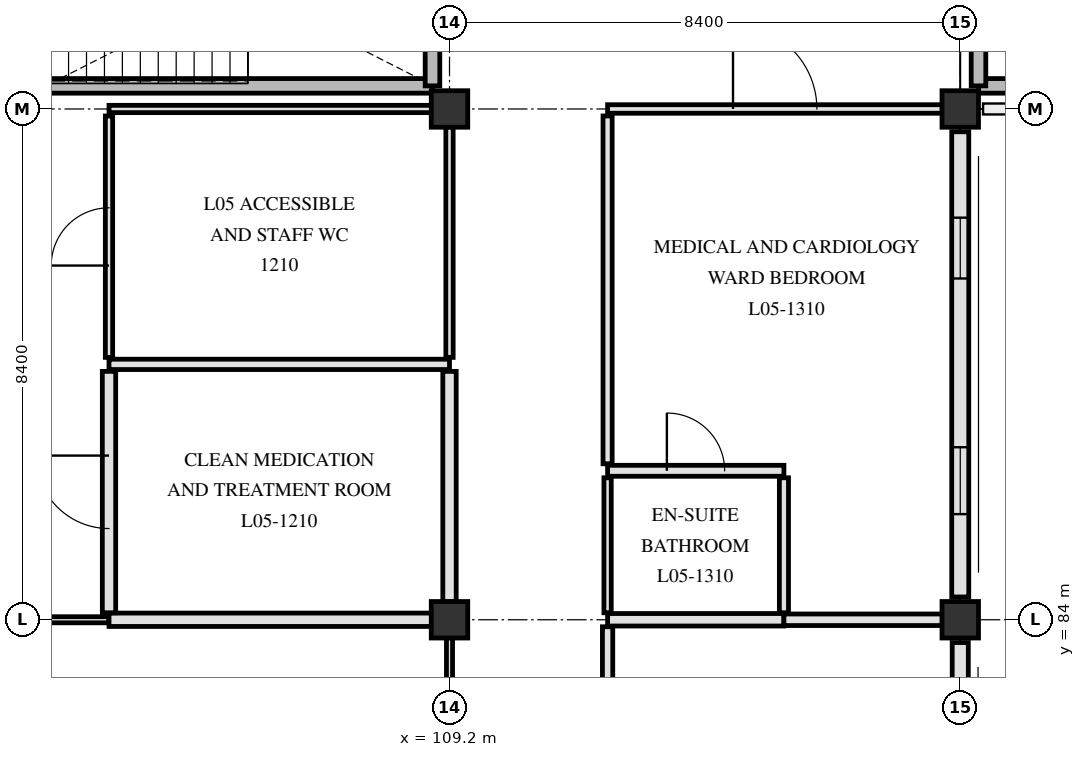
"""IFC4 building model, lengths in metres.
Left out: names, types, materials, properties, quantities, classifications, styles, units other than length and angle.
Written with IfcOpenShell. Run it as: python <this file> out.ifc"""

import sys

from ifc_helpers import new_model, si_unit, direction, frame, frame_2d, origin, origin_2d, place, context, subcontext, project, spatial, rectangle, extrude, element, fill, save


model = new_model("IFC4")
c1 = context("Model", 3, precision=1e-05, world=origin(), true_north=direction((0.0, 1.0)))
c2 = subcontext(c1, "Body", "Model", "MODEL_VIEW")
j1 = project(units=[si_unit("LENGTHUNIT", "METRE"), si_unit("PLANEANGLEUNIT", "RADIAN")], contexts=[c1])
p1 = place(None, origin())
s1 = spatial("IfcSite", under=j1, at=p1, CompositionType="ELEMENT")
p2 = place(p1, origin())
s2 = spatial("IfcBuilding", under=s1, at=p2, CompositionType="ELEMENT")
p3 = place(p2, frame((0.0, 0.0, 22.5)))
s3 = spatial("IfcBuildingStorey", under=s2, at=p3, CompositionType="ELEMENT", Elevation=22.5)
for number, where, z_axis, x_axis in (
    (1, (109.2, 84.0, 0.0), (0.0, 0.0, 1.0), (1.0, 0.0, 0.0)),
    (2, (109.2, 92.4, 0.0), (0.0, 0.0, 1.0), (1.0, 0.0, 0.0)),
    (3, (117.6, 84.0, 0.0), (0.0, 0.0, 1.0), (1.0, 0.0, 0.0)),
    (4, (117.6, 92.4, 0.0), (0.0, 0.0, 1.0), (1.0, 0.0, 0.0)),
):
    element("IfcColumn", number, at=place(p3, frame(where, z_axis=z_axis, x_axis=x_axis)), inside=s3, PredefinedType="COLUMN", context=c2, shape_type="SweptSolid", body=[
        extrude(rectangle(XDim=0.6, YDim=0.6, at=origin_2d()), origin(), (0.0, 0.0, 1.0), 3.9),
    ])
p4 = place(p3, frame((117.6, 92.025, 0.0), z_axis=(0.0, 0.0, 1.0), x_axis=(0.0, -1.0, 0.0)))
e5 = element("IfcWall", 5, at=p4, inside=s3, PredefinedType="SOLIDWALL", context=c2, shape_type="SweptSolid", body=[
    extrude(rectangle(XDim=7.65, YDim=0.28, at=frame_2d((3.825, 0.0))), origin(), (0.0, 0.0, 1.0), 3.34),
])
p5 = place(p4, frame((1.413, 0.0, 0.85)))
e6 = element("IfcOpeningElement", 6, at=p5, cuts=e5, PredefinedType="OPENING", context=c2, shape_type="SweptSolid", body=[
    extrude(rectangle(XDim=1.0, YDim=1.42, at=frame_2d((0.5, 0.71))), frame((0.0, 0.15, 0.0), z_axis=(0.0, -1.0, 0.0), x_axis=(1.0, 0.0, 0.0)), (0.0, 0.0, 1.0), 0.3),
])
p6 = place(p4, frame((5.188, 0.0, 0.85)))
e7 = element("IfcOpeningElement", 7, at=p6, cuts=e5, PredefinedType="OPENING", context=c2, shape_type="SweptSolid", body=[
    extrude(rectangle(XDim=1.1, YDim=1.42, at=frame_2d((0.55, 0.71))), frame((0.0, 0.15, 0.0), z_axis=(0.0, -1.0, 0.0), x_axis=(1.0, 0.0, 0.0)), (0.0, 0.0, 1.0), 0.3),
])
p7 = place(p3, frame((117.6, 83.625, 0.0), z_axis=(0.0, 0.0, 1.0), x_axis=(0.0, -1.0, 0.0)))
e8 = element("IfcWall", 8, at=p7, inside=s3, PredefinedType="SOLIDWALL", context=c2, shape_type="SweptSolid", body=[
    extrude(rectangle(XDim=7.65, YDim=0.265, at=frame_2d((3.825, 0.0))), origin(), (0.0, 0.0, 1.0), 3.38),
])
p8 = place(p7, frame((1.312, 0.0, 0.85)))
e9 = element("IfcOpeningElement", 9, at=p8, cuts=e8, PredefinedType="OPENING", context=c2, shape_type="SweptSolid", body=[
    extrude(rectangle(XDim=1.2, YDim=1.42, at=frame_2d((0.6, 0.71))), frame((0.0, 0.142, 0.0), z_axis=(0.0, -1.0, 0.0), x_axis=(1.0, 0.0, 0.0)), (0.0, 0.0, 1.0), 0.285),
])
p9 = place(p7, frame((5.087, 0.0, 0.85)))
e10 = element("IfcOpeningElement", 10, at=p9, cuts=e8, PredefinedType="OPENING", context=c2, shape_type="SweptSolid", body=[
    extrude(rectangle(XDim=1.3, YDim=1.42, at=frame_2d((0.65, 0.71))), frame((0.0, 0.142, 0.0), z_axis=(0.0, -1.0, 0.0), x_axis=(1.0, 0.0, 0.0)), (0.0, 0.0, 1.0), 0.285),
])
p10 = place(p3, frame((101.1, 92.78, 0.0), z_axis=(0.0, 0.0, 1.0), x_axis=(1.0, 0.0, 0.0)))
e11 = element("IfcWall", 11, at=p10, inside=s3, PredefinedType="SHEAR", context=c2, shape_type="SweptSolid", body=[
    extrude(rectangle(XDim=7.82, YDim=0.24, at=frame_2d((3.91, 0.0))), origin(), (0.0, 0.0, 1.0), 3.62),
])
p11 = place(p3, frame((108.92, 92.78, 0.0), z_axis=(0.0, 0.0, 1.0), x_axis=(0.0, 1.0, 0.0)))
e12 = element("IfcWall", 12, at=p11, inside=s3, PredefinedType="SHEAR", context=c2, shape_type="SweptSolid", body=[
    extrude(rectangle(XDim=3.32, YDim=0.24, at=frame_2d((1.66, 0.0))), origin(), (0.0, 0.0, 1.0), 3.62),
])
p12 = place(p3, frame((117.9, 92.78, 0.0), z_axis=(0.0, 0.0, 1.0), x_axis=(1.0, 0.0, 0.0)))
e13 = element("IfcWall", 13, at=p12, inside=s3, PredefinedType="SHEAR", context=c2, shape_type="SweptSolid", body=[
    extrude(rectangle(XDim=7.82, YDim=0.24, at=frame_2d((3.91, 0.0))), origin(), (0.0, 0.0, 1.0), 3.62),
])
p13 = place(p3, frame((117.9, 92.78, 0.0), z_axis=(0.0, 0.0, 1.0), x_axis=(0.0, 1.0, 0.0)))
e14 = element("IfcWall", 14, at=p13, inside=s3, PredefinedType="SHEAR", context=c2, shape_type="SweptSolid", body=[
    extrude(rectangle(XDim=3.32, YDim=0.24, at=frame_2d((1.66, 0.0))), origin(), (0.0, 0.0, 1.0), 3.62),
])
p14 = place(p3, frame((101.095, 84.0, 0.0), z_axis=(0.0, 0.0, 1.0), x_axis=(1.0, 0.0, 0.0)))
e15 = element("IfcWall", 15, at=p14, inside=s3, PredefinedType="PARTITIONING", context=c2, shape_type="SweptSolid", body=[
    extrude(rectangle(XDim=2.505, YDim=0.1, at=frame_2d((1.252, 0.0))), origin(), (0.0, 0.0, 1.0), 3.16),
])
p15 = place(p3, frame((103.6, 84.0, 0.0), z_axis=(0.0, 0.0, 1.0), x_axis=(1.0, 0.0, 0.0)))
e16 = element("IfcWall", 16, at=p15, inside=s3, PredefinedType="PARTITIONING", context=c2, shape_type="SweptSolid", body=[
    extrude(rectangle(XDim=5.305, YDim=0.22, at=frame_2d((2.652, 0.0))), origin(), (0.0, 0.0, 1.0), 3.16),
])
p16 = place(p3, frame((111.8, 84.0, 0.0), z_axis=(0.0, 0.0, 1.0), x_axis=(1.0, 0.0, 0.0)))
e17 = element("IfcWall", 17, at=p16, inside=s3, PredefinedType="PARTITIONING", context=c2, shape_type="SweptSolid", body=[
    extrude(rectangle(XDim=2.9, YDim=0.205, at=frame_2d((1.45, 0.0))), origin(), (0.0, 0.0, 1.0), 3.16),
])
p17 = place(p3, frame((114.7, 84.0, 0.0), z_axis=(0.0, 0.0, 1.0), x_axis=(1.0, 0.0, 0.0)))
e18 = element("IfcWall", 18, at=p17, inside=s3, PredefinedType="PARTITIONING", context=c2, shape_type="SweptSolid", body=[
    extrude(rectangle(XDim=2.605, YDim=0.19, at=frame_2d((1.302, 0.0))), origin(), (0.0, 0.0, 1.0), 3.16),
])
p18 = place(p3, frame((111.8, 86.45, 0.0), z_axis=(0.0, 0.0, 1.0), x_axis=(1.0, 0.0, 0.0)))
e19 = element("IfcWall", 19, at=p18, inside=s3, PredefinedType="PARTITIONING", context=c2, shape_type="SweptSolid", body=[
    extrude(rectangle(XDim=2.9, YDim=0.18, at=frame_2d((1.45, 0.0))), origin(), (0.0, 0.0, 1.0), 3.61),
])
p19 = place(p18, frame((0.975, 0.0, 0.0)))
e20 = element("IfcOpeningElement", 20, at=p19, cuts=e19, PredefinedType="OPENING", context=c2, shape_type="SweptSolid", body=[
    extrude(rectangle(XDim=0.95, YDim=2.1, at=frame_2d((0.475, 1.05))), frame((0.0, 0.1, 0.0), z_axis=(0.0, -1.0, 0.0), x_axis=(1.0, 0.0, 0.0)), (0.0, 0.0, 1.0), 0.2),
])
p20 = place(p3, frame((103.6, 88.2, 0.0), z_axis=(0.0, 0.0, 1.0), x_axis=(1.0, 0.0, 0.0)))
e21 = element("IfcWall", 21, at=p20, inside=s3, PredefinedType="PARTITIONING", context=c2, shape_type="SweptSolid", body=[
    extrude(rectangle(XDim=5.6, YDim=0.17, at=frame_2d((2.8, 0.0))), origin(), (0.0, 0.0, 1.0), 3.3),
])
p21 = place(p3, frame((103.6, 92.4, 0.0), z_axis=(0.0, 0.0, 1.0), x_axis=(1.0, 0.0, 0.0)))
e22 = element("IfcWall", 22, at=p21, inside=s3, PredefinedType="PARTITIONING", context=c2, shape_type="SweptSolid", body=[
    extrude(rectangle(XDim=5.305, YDim=0.12, at=frame_2d((2.652, 0.0))), origin(), (0.0, 0.0, 1.0), 3.16),
])
p22 = place(p3, frame((111.8, 92.4, 0.0), z_axis=(0.0, 0.0, 1.0), x_axis=(1.0, 0.0, 0.0)))
e23 = element("IfcWall", 23, at=p22, inside=s3, PredefinedType="PARTITIONING", context=c2, shape_type="SweptSolid", body=[
    extrude(rectangle(XDim=5.505, YDim=0.14, at=frame_2d((2.752, 0.0))), origin(), (0.0, 0.0, 1.0), 3.16),
])
p23 = place(p22, frame((2.062, 0.0, 0.0)))
e24 = element("IfcOpeningElement", 24, at=p23, cuts=e23, PredefinedType="OPENING", context=c2, shape_type="SweptSolid", body=[
    extrude(rectangle(XDim=1.38, YDim=2.22, at=frame_2d((0.69, 1.11))), frame((0.0, 0.08, 0.0), z_axis=(0.0, -1.0, 0.0), x_axis=(1.0, 0.0, 0.0)), (0.0, 0.0, 1.0), 0.16),
])
p24 = place(p3, frame((103.6, 84.115, 0.0), z_axis=(0.0, 0.0, 1.0), x_axis=(0.0, 1.0, 0.0)))
e25 = element("IfcWall", 25, at=p24, inside=s3, PredefinedType="PARTITIONING", context=c2, shape_type="SweptSolid", body=[
    extrude(rectangle(XDim=3.97, YDim=0.22, at=frame_2d((1.985, 0.0))), origin(), (0.0, 0.0, 1.0), 3.34),
])
p25 = place(p24, frame((1.385, 0.0, 0.0)))
e26 = element("IfcOpeningElement", 26, at=p25, cuts=e25, PredefinedType="OPENING", context=c2, shape_type="SweptSolid", body=[
    extrude(rectangle(XDim=1.2, YDim=2.15, at=frame_2d((0.6, 1.075))), frame((0.0, 0.12, 0.0), z_axis=(0.0, -1.0, 0.0), x_axis=(1.0, 0.0, 0.0)), (0.0, 0.0, 1.0), 0.24),
])
p26 = place(p3, frame((103.6, 88.315, 0.0), z_axis=(0.0, 0.0, 1.0), x_axis=(0.0, 1.0, 0.0)))
e27 = element("IfcWall", 27, at=p26, inside=s3, PredefinedType="PARTITIONING", context=c2, shape_type="SweptSolid", body=[
    extrude(rectangle(XDim=3.97, YDim=0.12, at=frame_2d((1.985, 0.0))), origin(), (0.0, 0.0, 1.0), 3.34),
])
p27 = place(p26, frame((1.51, 0.0, 0.0)))
e28 = element("IfcOpeningElement", 28, at=p27, cuts=e27, PredefinedType="OPENING", context=c2, shape_type="SweptSolid", body=[
    extrude(rectangle(XDim=0.95, YDim=2.1, at=frame_2d((0.475, 1.05))), frame((0.0, 0.07, 0.0), z_axis=(0.0, -1.0, 0.0), x_axis=(1.0, 0.0, 0.0)), (0.0, 0.0, 1.0), 0.14),
])
p28 = place(p3, frame((109.2, 78.315, 0.0), z_axis=(0.0, 0.0, 1.0), x_axis=(0.0, 1.0, 0.0)))
e29 = element("IfcWall", 29, at=p28, inside=s3, PredefinedType="PARTITIONING", context=c2, shape_type="SweptSolid", body=[
    extrude(rectangle(XDim=5.39, YDim=0.1, at=frame_2d((2.695, 0.0))), origin(), (0.0, 0.0, 1.0), 3.3),
])
p29 = place(p3, frame((109.2, 84.295, 0.0), z_axis=(0.0, 0.0, 1.0), x_axis=(0.0, 1.0, 0.0)))
e30 = element("IfcWall", 30, at=p29, inside=s3, PredefinedType="PARTITIONING", context=c2, shape_type="SweptSolid", body=[
    extrude(rectangle(XDim=3.79, YDim=0.22, at=frame_2d((1.895, 0.0))), origin(), (0.0, 0.0, 1.0), 3.3),
])
p30 = place(p3, frame((109.2, 88.315, 0.0), z_axis=(0.0, 0.0, 1.0), x_axis=(0.0, 1.0, 0.0)))
e31 = element("IfcWall", 31, at=p30, inside=s3, PredefinedType="PARTITIONING", context=c2, shape_type="SweptSolid", body=[
    extrude(rectangle(XDim=3.79, YDim=0.12, at=frame_2d((1.895, 0.0))), origin(), (0.0, 0.0, 1.0), 3.3),
])
p31 = place(p3, frame((111.8, 78.315, 0.0), z_axis=(0.0, 0.0, 1.0), x_axis=(0.0, 1.0, 0.0)))
e32 = element("IfcWall", 32, at=p31, inside=s3, PredefinedType="PARTITIONING", context=c2, shape_type="SweptSolid", body=[
    extrude(rectangle(XDim=5.57, YDim=0.17, at=frame_2d((2.785, 0.0))), origin(), (0.0, 0.0, 1.0), 3.34),
])
p32 = place(p3, frame((111.8, 84.115, 0.0), z_axis=(0.0, 0.0, 1.0), x_axis=(0.0, 1.0, 0.0)))
e33 = element("IfcWall", 33, at=p32, inside=s3, PredefinedType="PARTITIONING", context=c2, shape_type="SweptSolid", body=[
    extrude(rectangle(XDim=2.22, YDim=0.12, at=frame_2d((1.11, 0.0))), origin(), (0.0, 0.0, 1.0), 3.61),
])
p33 = place(p3, frame((111.8, 86.565, 0.0), z_axis=(0.0, 0.0, 1.0), x_axis=(0.0, 1.0, 0.0)))
e34 = element("IfcWall", 34, at=p33, inside=s3, PredefinedType="PARTITIONING", context=c2, shape_type="SweptSolid", body=[
    extrude(rectangle(XDim=5.72, YDim=0.15, at=frame_2d((2.86, 0.0))), origin(), (0.0, 0.0, 1.0), 3.34),
])
p34 = place(p3, frame((114.7, 84.115, 0.0), z_axis=(0.0, 0.0, 1.0), x_axis=(0.0, 1.0, 0.0)))
e35 = element("IfcWall", 35, at=p34, inside=s3, PredefinedType="PARTITIONING", context=c2, shape_type="SweptSolid", body=[
    extrude(rectangle(XDim=2.22, YDim=0.15, at=frame_2d((1.11, 0.0))), origin(), (0.0, 0.0, 1.0), 3.61),
])
p35 = place(p5, origin())
e36 = element("IfcWindow", 36, at=p35, inside=s3, PartitioningType="SINGLE_PANEL", PredefinedType="WINDOW", context=c2, shape_type="SweptSolid", body=[
    extrude(rectangle(XDim=1.0, YDim=1.42, at=frame_2d((0.5, 0.71))), frame((0.0, 0.03, 0.0), z_axis=(0.0, -1.0, 0.0), x_axis=(1.0, 0.0, 0.0)), (0.0, 0.0, 1.0), 0.06),
])
fill(e6, e36)
p36 = place(p6, origin())
e37 = element("IfcWindow", 37, at=p36, inside=s3, PartitioningType="SINGLE_PANEL", PredefinedType="WINDOW", context=c2, shape_type="SweptSolid", body=[
    extrude(rectangle(XDim=1.1, YDim=1.42, at=frame_2d((0.55, 0.71))), frame((0.0, 0.03, 0.0), z_axis=(0.0, -1.0, 0.0), x_axis=(1.0, 0.0, 0.0)), (0.0, 0.0, 1.0), 0.06),
])
fill(e7, e37)
p37 = place(p25, origin())
e38 = element("IfcDoor", 38, at=p37, inside=s3, OperationType="SINGLE_SWING_RIGHT", PredefinedType="DOOR", context=c2, shape_type="SweptSolid", body=[
    extrude(rectangle(XDim=1.2, YDim=2.15, at=frame_2d((0.6, 1.075))), frame((0.0, 0.025, 0.0), z_axis=(0.0, -1.0, 0.0), x_axis=(1.0, 0.0, 0.0)), (0.0, 0.0, 1.0), 0.05),
])
fill(e26, e38)
p38 = place(p27, origin())
e39 = element("IfcDoor", 39, at=p38, inside=s3, OperationType="SINGLE_SWING_LEFT", PredefinedType="DOOR", context=c2, shape_type="SweptSolid", body=[
    extrude(rectangle(XDim=0.95, YDim=2.1, at=frame_2d((0.475, 1.05))), frame((0.0, 0.025, 0.0), z_axis=(0.0, -1.0, 0.0), x_axis=(1.0, 0.0, 0.0)), (0.0, 0.0, 1.0), 0.05),
])
fill(e28, e39)
p39 = place(p23, origin())
e40 = element("IfcDoor", 40, at=p39, inside=s3, OperationType="SINGLE_SWING_LEFT", PredefinedType="DOOR", context=c2, shape_type="SweptSolid", body=[
    extrude(rectangle(XDim=1.38, YDim=2.22, at=frame_2d((0.69, 1.11))), frame((0.0, 0.025, 0.0), z_axis=(0.0, -1.0, 0.0), x_axis=(1.0, 0.0, 0.0)), (0.0, 0.0, 1.0), 0.05),
])
fill(e24, e40)
p40 = place(p19, origin())
e41 = element("IfcDoor", 41, at=p40, inside=s3, OperationType="SINGLE_SWING_LEFT", PredefinedType="DOOR", context=c2, shape_type="SweptSolid", body=[
    extrude(rectangle(XDim=0.95, YDim=2.1, at=frame_2d((0.475, 1.05))), frame((0.0, 0.025, 0.0), z_axis=(0.0, -1.0, 0.0), x_axis=(1.0, 0.0, 0.0)), (0.0, 0.0, 1.0), 0.05),
])
fill(e20, e41)
save(model, sys.argv[1])
